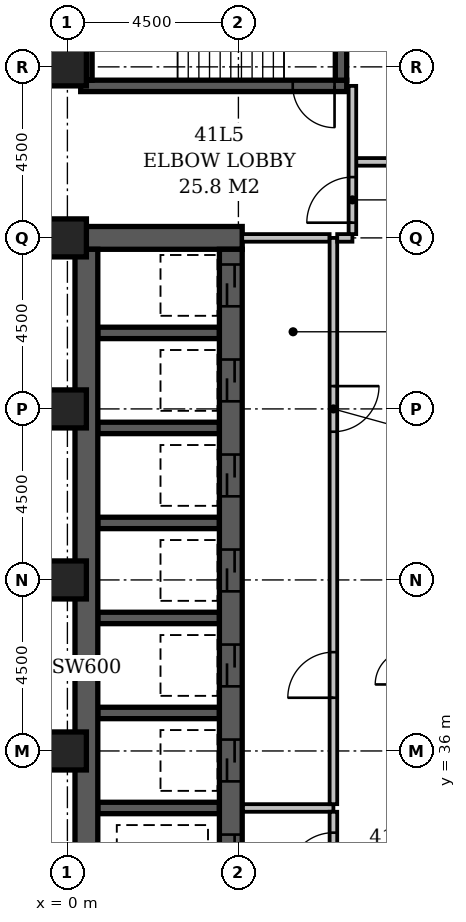
"""IFC4 building model, lengths in metres.
Left out: names, types, materials, properties, quantities, classifications, styles, units other than length and angle.
Written with IfcOpenShell. Run it as: python <this file> out.ifc"""

import sys

from ifc_helpers import new_model, si_unit, direction, frame, frame_2d, origin, origin_2d, place, context, subcontext, project, spatial, rectangle, extrude, element, fill, save


model = new_model("IFC4")
c1 = context("Model", 3, precision=1e-05, world=origin(), true_north=direction((0.0, 1.0)))
c2 = subcontext(c1, "Body", "Model", "MODEL_VIEW")
j1 = project(units=[si_unit("LENGTHUNIT", "METRE"), si_unit("PLANEANGLEUNIT", "RADIAN")], contexts=[c1])
p1 = place(None, origin())
s1 = spatial("IfcSite", under=j1, at=p1, CompositionType="ELEMENT")
p2 = place(p1, origin())
s2 = spatial("IfcBuilding", under=s1, at=p2, CompositionType="ELEMENT")
p3 = place(p2, frame((0.0, 0.0, 162.8)))
s3 = spatial("IfcBuildingStorey", under=s2, at=p3, CompositionType="ELEMENT", Elevation=162.8)
p4 = place(p3, frame((0.2, 49.5, -0.3), z_axis=(0.0, 0.0, 1.0), x_axis=(1.0, 0.0, 0.0)))
e1 = element("IfcWall", 1, at=p4, inside=s3, PredefinedType="SHEAR", context=c2, shape_type="SweptSolid", body=[
    extrude(rectangle(XDim=4.4, YDim=0.6, at=frame_2d((2.2, 0.0))), origin(), (0.0, 0.0, 1.0), 3.6),
])
p5 = place(p3, frame((0.35, 53.5, -0.3), z_axis=(0.0, 0.0, 1.0), x_axis=(1.0, 0.0, 0.0)))
e2 = element("IfcWall", 2, at=p5, inside=s3, PredefinedType="SHEAR", context=c2, shape_type="SweptSolid", body=[
    extrude(rectangle(XDim=7.0, YDim=0.3, at=frame_2d((3.5, 0.0))), origin(), (0.0, 0.0, 1.0), 3.6),
])
p6 = place(p5, frame((5.58, 0.0, 0.3)))
e3 = element("IfcOpeningElement", 3, at=p6, cuts=e2, PredefinedType="OPENING", context=c2, shape_type="SweptSolid", body=[
    extrude(rectangle(XDim=1.1, YDim=2.1, at=frame_2d((0.55, 1.05))), frame((0.0, 0.162, 0.0), z_axis=(0.0, -1.0, 0.0), x_axis=(1.0, 0.0, 0.0)), (0.0, 0.0, 1.0), 0.324),
])
p7 = place(p3, frame((0.5, 27.15, -0.3), z_axis=(0.0, 0.0, 1.0), x_axis=(0.0, 1.0, 0.0)))
e4 = element("IfcWall", 4, at=p7, inside=s3, PredefinedType="SHEAR", context=c2, shape_type="SweptSolid", body=[
    extrude(rectangle(XDim=22.05, YDim=0.6, at=frame_2d((11.025, 0.0))), origin(), (0.0, 0.0, 1.0), 3.6),
])
p8 = place(p3, frame((0.5, 53.65, -0.3), z_axis=(0.0, 0.0, 1.0), x_axis=(0.0, 1.0, 0.0)))
e5 = element("IfcWall", 5, at=p8, inside=s3, PredefinedType="SHEAR", context=c2, shape_type="SweptSolid", body=[
    extrude(rectangle(XDim=4.2, YDim=0.3, at=frame_2d((2.1, 0.0))), origin(), (0.0, 0.0, 1.0), 3.6),
])
for number, where, z_axis, x_axis in (
    (6, (0.8, 34.5, -0.3), (0.0, 0.0, 1.0), (1.0, 0.0, 0.0)),
    (7, (0.8, 37.0, -0.3), (0.0, 0.0, 1.0), (1.0, 0.0, 0.0)),
    (8, (0.8, 39.5, -0.3), (0.0, 0.0, 1.0), (1.0, 0.0, 0.0)),
    (9, (0.8, 42.0, -0.3), (0.0, 0.0, 1.0), (1.0, 0.0, 0.0)),
    (10, (0.8, 44.5, -0.3), (0.0, 0.0, 1.0), (1.0, 0.0, 0.0)),
    (11, (0.8, 47.0, -0.3), (0.0, 0.0, 1.0), (1.0, 0.0, 0.0)),
):
    element("IfcWall", number, at=place(p3, frame(where, z_axis=z_axis, x_axis=x_axis)), inside=s3, PredefinedType="SHEAR", context=c2, shape_type="SweptSolid", body=[
        extrude(rectangle(XDim=3.2, YDim=0.3, at=frame_2d((1.6, 0.0))), origin(), (0.0, 0.0, 1.0), 3.6),
    ])
p9 = place(p3, frame((4.3, 27.15, -0.3), z_axis=(0.0, 0.0, 1.0), x_axis=(0.0, 1.0, 0.0)))
e12 = element("IfcWall", 12, at=p9, inside=s3, PredefinedType="SHEAR", context=c2, shape_type="SweptSolid", body=[
    extrude(rectangle(XDim=22.05, YDim=0.6, at=frame_2d((11.025, 0.0))), origin(), (0.0, 0.0, 1.0), 3.6),
])
p10 = place(p9, frame((3.05, 0.0, 0.3)))
e13 = element("IfcOpeningElement", 13, at=p10, cuts=e12, PredefinedType="OPENING", context=c2, shape_type="SweptSolid", body=[
    extrude(rectangle(XDim=1.1, YDim=2.1, at=frame_2d((0.55, 1.05))), frame((0.0, 0.312, 0.0), z_axis=(0.0, -1.0, 0.0), x_axis=(1.0, 0.0, 0.0)), (0.0, 0.0, 1.0), 0.624),
])
p11 = place(p9, frame((0.55, 0.0, 0.3)))
e14 = element("IfcOpeningElement", 14, at=p11, cuts=e12, PredefinedType="OPENING", context=c2, shape_type="SweptSolid", body=[
    extrude(rectangle(XDim=1.1, YDim=2.1, at=frame_2d((0.55, 1.05))), frame((0.0, 0.312, 0.0), z_axis=(0.0, -1.0, 0.0), x_axis=(1.0, 0.0, 0.0)), (0.0, 0.0, 1.0), 0.624),
])
p12 = place(p9, frame((20.55, 0.0, 0.3)))
e15 = element("IfcOpeningElement", 15, at=p12, cuts=e12, PredefinedType="OPENING", context=c2, shape_type="SweptSolid", body=[
    extrude(rectangle(XDim=1.1, YDim=2.1, at=frame_2d((0.55, 1.05))), frame((0.0, 0.312, 0.0), z_axis=(0.0, -1.0, 0.0), x_axis=(1.0, 0.0, 0.0)), (0.0, 0.0, 1.0), 0.624),
])
p13 = place(p9, frame((18.05, 0.0, 0.3)))
e16 = element("IfcOpeningElement", 16, at=p13, cuts=e12, PredefinedType="OPENING", context=c2, shape_type="SweptSolid", body=[
    extrude(rectangle(XDim=1.1, YDim=2.1, at=frame_2d((0.55, 1.05))), frame((0.0, 0.312, 0.0), z_axis=(0.0, -1.0, 0.0), x_axis=(1.0, 0.0, 0.0)), (0.0, 0.0, 1.0), 0.624),
])
p14 = place(p9, frame((15.55, 0.0, 0.3)))
e17 = element("IfcOpeningElement", 17, at=p14, cuts=e12, PredefinedType="OPENING", context=c2, shape_type="SweptSolid", body=[
    extrude(rectangle(XDim=1.1, YDim=2.1, at=frame_2d((0.55, 1.05))), frame((0.0, 0.312, 0.0), z_axis=(0.0, -1.0, 0.0), x_axis=(1.0, 0.0, 0.0)), (0.0, 0.0, 1.0), 0.624),
])
p15 = place(p9, frame((13.05, 0.0, 0.3)))
e18 = element("IfcOpeningElement", 18, at=p15, cuts=e12, PredefinedType="OPENING", context=c2, shape_type="SweptSolid", body=[
    extrude(rectangle(XDim=1.1, YDim=2.1, at=frame_2d((0.55, 1.05))), frame((0.0, 0.312, 0.0), z_axis=(0.0, -1.0, 0.0), x_axis=(1.0, 0.0, 0.0)), (0.0, 0.0, 1.0), 0.624),
])
p16 = place(p9, frame((10.55, 0.0, 0.3)))
e19 = element("IfcOpeningElement", 19, at=p16, cuts=e12, PredefinedType="OPENING", context=c2, shape_type="SweptSolid", body=[
    extrude(rectangle(XDim=1.1, YDim=2.1, at=frame_2d((0.55, 1.05))), frame((0.0, 0.312, 0.0), z_axis=(0.0, -1.0, 0.0), x_axis=(1.0, 0.0, 0.0)), (0.0, 0.0, 1.0), 0.624),
])
p17 = place(p9, frame((8.05, 0.0, 0.3)))
e20 = element("IfcOpeningElement", 20, at=p17, cuts=e12, PredefinedType="OPENING", context=c2, shape_type="SweptSolid", body=[
    extrude(rectangle(XDim=1.1, YDim=2.1, at=frame_2d((0.55, 1.05))), frame((0.0, 0.312, 0.0), z_axis=(0.0, -1.0, 0.0), x_axis=(1.0, 0.0, 0.0)), (0.0, 0.0, 1.0), 0.624),
])
p18 = place(p9, frame((5.55, 0.0, 0.3)))
e21 = element("IfcOpeningElement", 21, at=p18, cuts=e12, PredefinedType="OPENING", context=c2, shape_type="SweptSolid", body=[
    extrude(rectangle(XDim=1.1, YDim=2.1, at=frame_2d((0.55, 1.05))), frame((0.0, 0.312, 0.0), z_axis=(0.0, -1.0, 0.0), x_axis=(1.0, 0.0, 0.0)), (0.0, 0.0, 1.0), 0.624),
])
p19 = place(p3, frame((7.2, 53.65, -0.3), z_axis=(0.0, 0.0, 1.0), x_axis=(0.0, 1.0, 0.0)))
e22 = element("IfcWall", 22, at=p19, inside=s3, PredefinedType="SHEAR", context=c2, shape_type="SweptSolid", body=[
    extrude(rectangle(XDim=4.2, YDim=0.3, at=frame_2d((2.1, 0.0))), origin(), (0.0, 0.0, 1.0), 3.6),
])
for number, where, z_axis, x_axis in (
    (23, (0.0, 36.0, -0.3), (0.0, 0.0, 1.0), (1.0, 0.0, 0.0)),
    (24, (0.0, 40.5, -0.3), (0.0, 0.0, 1.0), (1.0, 0.0, 0.0)),
    (25, (0.0, 45.0, -0.3), (0.0, 0.0, 1.0), (1.0, 0.0, 0.0)),
    (26, (0.0, 49.5, -0.3), (0.0, 0.0, 1.0), (1.0, 0.0, 0.0)),
    (27, (0.0, 54.0, -0.3), (0.0, 0.0, 1.0), (1.0, 0.0, 0.0)),
):
    element("IfcColumn", number, at=place(p3, frame(where, z_axis=z_axis, x_axis=x_axis)), inside=s3, PredefinedType="COLUMN", context=c2, shape_type="SweptSolid", body=[
        extrude(rectangle(XDim=1.0, YDim=1.0, at=origin_2d()), origin(), (0.0, 0.0, 1.0), 3.6),
    ])
p20 = place(p3, frame((4.62, 34.5, 0.0), z_axis=(0.0, 0.0, 1.0), x_axis=(1.0, 0.0, 0.0)))
e28 = element("IfcWall", 28, at=p20, inside=s3, PredefinedType="PARTITIONING", context=c2, shape_type="SweptSolid", body=[
    extrude(rectangle(XDim=2.38, YDim=0.2, at=frame_2d((1.19, 0.0))), origin(), (0.0, 0.0, 1.0), 3.3),
])
p21 = place(p3, frame((7.0, 34.6, 0.0), z_axis=(0.0, 0.0, 1.0), x_axis=(0.0, 1.0, 0.0)))
e29 = element("IfcWall", 29, at=p21, inside=s3, PredefinedType="PARTITIONING", context=c2, shape_type="SweptSolid", body=[
    extrude(rectangle(XDim=14.9, YDim=0.2, at=frame_2d((7.45, 0.0))), origin(), (0.0, 0.0, 1.0), 3.3),
])
p22 = place(p21, frame((2.8, 0.0, 0.0)))
e30 = element("IfcOpeningElement", 30, at=p22, cuts=e29, PredefinedType="OPENING", context=c2, shape_type="SweptSolid", body=[
    extrude(rectangle(XDim=1.2, YDim=2.1, at=frame_2d((0.6, 1.05))), frame((0.0, 0.112, 0.0), z_axis=(0.0, -1.0, 0.0), x_axis=(1.0, 0.0, 0.0)), (0.0, 0.0, 1.0), 0.224),
])
p23 = place(p21, frame((9.8, 0.0, 0.0)))
e31 = element("IfcOpeningElement", 31, at=p23, cuts=e29, PredefinedType="OPENING", context=c2, shape_type="SweptSolid", body=[
    extrude(rectangle(XDim=1.2, YDim=2.1, at=frame_2d((0.6, 1.05))), frame((0.0, 0.112, 0.0), z_axis=(0.0, -1.0, 0.0), x_axis=(1.0, 0.0, 0.0)), (0.0, 0.0, 1.0), 0.224),
])
p24 = place(p3, frame((4.6, 49.5, 0.0), z_axis=(0.0, 0.0, 1.0), x_axis=(1.0, 0.0, 0.0)))
e32 = element("IfcWall", 32, at=p24, inside=s3, PredefinedType="PARTITIONING", context=c2, shape_type="SweptSolid", body=[
    extrude(rectangle(XDim=2.3, YDim=0.2, at=frame_2d((1.15, 0.0))), origin(), (0.0, 0.0, 1.0), 3.3),
])
p25 = place(p3, frame((7.0, 32.1, 0.0), z_axis=(0.0, 0.0, 1.0), x_axis=(0.0, 1.0, 0.0)))
e33 = element("IfcWall", 33, at=p25, inside=s3, PredefinedType="PARTITIONING", context=c2, shape_type="SweptSolid", body=[
    extrude(rectangle(XDim=2.3, YDim=0.2, at=frame_2d((1.15, 0.0))), origin(), (0.0, 0.0, 1.0), 3.3),
])
p26 = place(p25, frame((0.55, 0.0, 0.0)))
e34 = element("IfcOpeningElement", 34, at=p26, cuts=e33, PredefinedType="OPENING", context=c2, shape_type="SweptSolid", body=[
    extrude(rectangle(XDim=1.2, YDim=2.1, at=frame_2d((0.6, 1.05))), frame((0.0, 0.112, 0.0), z_axis=(0.0, -1.0, 0.0), x_axis=(1.0, 0.0, 0.0)), (0.0, 0.0, 1.0), 0.224),
])
p27 = place(p3, frame((7.1, 49.5, 0.0), z_axis=(0.0, 0.0, 1.0), x_axis=(1.0, 0.0, 0.0)))
e35 = element("IfcWall", 35, at=p27, inside=s3, PredefinedType="PARTITIONING", context=c2, shape_type="SweptSolid", body=[
    extrude(rectangle(XDim=0.4, YDim=0.2, at=frame_2d((0.2, 0.0))), origin(), (0.0, 0.0, 1.0), 3.3),
])
p28 = place(p3, frame((7.5, 49.6, 0.0), z_axis=(0.0, 0.0, 1.0), x_axis=(0.0, 1.0, 0.0)))
e36 = element("IfcWall", 36, at=p28, inside=s3, PredefinedType="PARTITIONING", context=c2, shape_type="SweptSolid", body=[
    extrude(rectangle(XDim=3.9, YDim=0.2, at=frame_2d((1.95, 0.0))), origin(), (0.0, 0.0, 1.0), 3.3),
])
p29 = place(p28, frame((0.3, 0.0, 0.0)))
e37 = element("IfcOpeningElement", 37, at=p29, cuts=e36, PredefinedType="OPENING", context=c2, shape_type="SweptSolid", body=[
    extrude(rectangle(XDim=1.2, YDim=2.1, at=frame_2d((0.6, 1.05))), frame((0.0, 0.112, 0.0), z_axis=(0.0, -1.0, 0.0), x_axis=(1.0, 0.0, 0.0)), (0.0, 0.0, 1.0), 0.224),
])
p30 = place(p3, frame((7.6, 51.5, 0.0), z_axis=(0.0, 0.0, 1.0), x_axis=(1.0, 0.0, 0.0)))
e38 = element("IfcWall", 38, at=p30, inside=s3, PredefinedType="PARTITIONING", context=c2, shape_type="SweptSolid", body=[
    extrude(rectangle(XDim=15.3, YDim=0.2, at=frame_2d((7.65, 0.0))), origin(), (0.0, 0.0, 1.0), 3.3),
])
p31 = place(p30, frame((2.075, 0.0, 0.0)))
e39 = element("IfcOpeningElement", 39, at=p31, cuts=e38, PredefinedType="OPENING", context=c2, shape_type="SweptSolid", body=[
    extrude(rectangle(XDim=1.0, YDim=2.1, at=frame_2d((0.5, 1.05))), frame((0.0, 0.112, 0.0), z_axis=(0.0, -1.0, 0.0), x_axis=(1.0, 0.0, 0.0)), (0.0, 0.0, 1.0), 0.224),
])
p32 = place(p30, frame((7.6, 0.0, 0.0)))
e40 = element("IfcOpeningElement", 40, at=p32, cuts=e38, PredefinedType="OPENING", context=c2, shape_type="SweptSolid", body=[
    extrude(rectangle(XDim=1.0, YDim=2.1, at=frame_2d((0.5, 1.05))), frame((0.0, 0.112, 0.0), z_axis=(0.0, -1.0, 0.0), x_axis=(1.0, 0.0, 0.0)), (0.0, 0.0, 1.0), 0.224),
])
p33 = place(p30, frame((12.725, 0.0, 0.0)))
e41 = element("IfcOpeningElement", 41, at=p33, cuts=e38, PredefinedType="OPENING", context=c2, shape_type="SweptSolid", body=[
    extrude(rectangle(XDim=0.9, YDim=2.1, at=frame_2d((0.45, 1.05))), frame((0.0, 0.112, 0.0), z_axis=(0.0, -1.0, 0.0), x_axis=(1.0, 0.0, 0.0)), (0.0, 0.0, 1.0), 0.224),
])
p34 = place(p29, origin())
e42 = element("IfcDoor", 42, at=p34, inside=s3, OperationType="SINGLE_SWING_LEFT", PredefinedType="DOOR", context=c2, shape_type="SweptSolid", body=[
    extrude(rectangle(XDim=1.2, YDim=2.1, at=frame_2d((0.6, 1.05))), frame((0.0, 0.025, 0.0), z_axis=(0.0, -1.0, 0.0), x_axis=(1.0, 0.0, 0.0)), (0.0, 0.0, 1.0), 0.05),
])
fill(e37, e42)
p35 = place(p12, origin())
e43 = element("IfcDoor", 43, at=p35, inside=s3, OperationType="SLIDING_TO_LEFT", PredefinedType="DOOR", context=c2, shape_type="SweptSolid", body=[
    extrude(rectangle(XDim=1.1, YDim=2.1, at=frame_2d((0.55, 1.05))), frame((0.0, 0.025, 0.0), z_axis=(0.0, -1.0, 0.0), x_axis=(1.0, 0.0, 0.0)), (0.0, 0.0, 1.0), 0.05),
])
fill(e15, e43)
p36 = place(p13, origin())
e44 = element("IfcDoor", 44, at=p36, inside=s3, OperationType="SLIDING_TO_LEFT", PredefinedType="DOOR", context=c2, shape_type="SweptSolid", body=[
    extrude(rectangle(XDim=1.1, YDim=2.1, at=frame_2d((0.55, 1.05))), frame((0.0, 0.025, 0.0), z_axis=(0.0, -1.0, 0.0), x_axis=(1.0, 0.0, 0.0)), (0.0, 0.0, 1.0), 0.05),
])
fill(e16, e44)
p37 = place(p14, origin())
e45 = element("IfcDoor", 45, at=p37, inside=s3, OperationType="SLIDING_TO_LEFT", PredefinedType="DOOR", context=c2, shape_type="SweptSolid", body=[
    extrude(rectangle(XDim=1.1, YDim=2.1, at=frame_2d((0.55, 1.05))), frame((0.0, 0.025, 0.0), z_axis=(0.0, -1.0, 0.0), x_axis=(1.0, 0.0, 0.0)), (0.0, 0.0, 1.0), 0.05),
])
fill(e17, e45)
p38 = place(p15, origin())
e46 = element("IfcDoor", 46, at=p38, inside=s3, OperationType="SLIDING_TO_LEFT", PredefinedType="DOOR", context=c2, shape_type="SweptSolid", body=[
    extrude(rectangle(XDim=1.1, YDim=2.1, at=frame_2d((0.55, 1.05))), frame((0.0, 0.025, 0.0), z_axis=(0.0, -1.0, 0.0), x_axis=(1.0, 0.0, 0.0)), (0.0, 0.0, 1.0), 0.05),
])
fill(e18, e46)
p39 = place(p16, origin())
e47 = element("IfcDoor", 47, at=p39, inside=s3, OperationType="SLIDING_TO_LEFT", PredefinedType="DOOR", context=c2, shape_type="SweptSolid", body=[
    extrude(rectangle(XDim=1.1, YDim=2.1, at=frame_2d((0.55, 1.05))), frame((0.0, 0.025, 0.0), z_axis=(0.0, -1.0, 0.0), x_axis=(1.0, 0.0, 0.0)), (0.0, 0.0, 1.0), 0.05),
])
fill(e19, e47)
p40 = place(p17, origin())
e48 = element("IfcDoor", 48, at=p40, inside=s3, OperationType="SLIDING_TO_LEFT", PredefinedType="DOOR", context=c2, shape_type="SweptSolid", body=[
    extrude(rectangle(XDim=1.1, YDim=2.1, at=frame_2d((0.55, 1.05))), frame((0.0, 0.025, 0.0), z_axis=(0.0, -1.0, 0.0), x_axis=(1.0, 0.0, 0.0)), (0.0, 0.0, 1.0), 0.05),
])
fill(e20, e48)
p41 = place(p22, origin())
e49 = element("IfcDoor", 49, at=p41, inside=s3, OperationType="SINGLE_SWING_LEFT", PredefinedType="DOOR", context=c2, shape_type="SweptSolid", body=[
    extrude(rectangle(XDim=1.2, YDim=2.1, at=frame_2d((0.6, 1.05))), frame((0.0, 0.025, 0.0), z_axis=(0.0, -1.0, 0.0), x_axis=(1.0, 0.0, 0.0)), (0.0, 0.0, 1.0), 0.05),
])
fill(e30, e49)
p42 = place(p23, origin())
e50 = element("IfcDoor", 50, at=p42, inside=s3, OperationType="SINGLE_SWING_RIGHT", PredefinedType="DOOR", context=c2, shape_type="SweptSolid", body=[
    extrude(rectangle(XDim=1.2, YDim=2.1, at=frame_2d((0.6, 1.05))), frame((0.0, 0.025, 0.0), z_axis=(0.0, -1.0, 0.0), x_axis=(1.0, 0.0, 0.0)), (0.0, 0.0, 1.0), 0.05),
])
fill(e31, e50)
p43 = place(p26, origin())
e51 = element("IfcDoor", 51, at=p43, inside=s3, OperationType="SINGLE_SWING_LEFT", PredefinedType="DOOR", context=c2, shape_type="SweptSolid", body=[
    extrude(rectangle(XDim=1.2, YDim=2.1, at=frame_2d((0.6, 1.05))), frame((0.0, 0.025, 0.0), z_axis=(0.0, -1.0, 0.0), x_axis=(1.0, 0.0, 0.0)), (0.0, 0.0, 1.0), 0.05),
])
fill(e34, e51)
p44 = place(p18, origin())
e52 = element("IfcDoor", 52, at=p44, inside=s3, OperationType="SLIDING_TO_LEFT", PredefinedType="DOOR", context=c2, shape_type="SweptSolid", body=[
    extrude(rectangle(XDim=1.1, YDim=2.1, at=frame_2d((0.55, 1.05))), frame((0.0, 0.025, 0.0), z_axis=(0.0, -1.0, 0.0), x_axis=(1.0, 0.0, 0.0)), (0.0, 0.0, 1.0), 0.05),
])
fill(e21, e52)
p45 = place(p6, origin())
e53 = element("IfcDoor", 53, at=p45, inside=s3, OperationType="SINGLE_SWING_RIGHT", PredefinedType="DOOR", context=c2, shape_type="SweptSolid", body=[
    extrude(rectangle(XDim=1.1, YDim=2.1, at=frame_2d((0.55, 1.05))), frame((0.0, 0.025, 0.0), z_axis=(0.0, -1.0, 0.0), x_axis=(1.0, 0.0, 0.0)), (0.0, 0.0, 1.0), 0.05),
])
fill(e3, e53)
save(model, sys.argv[1])
